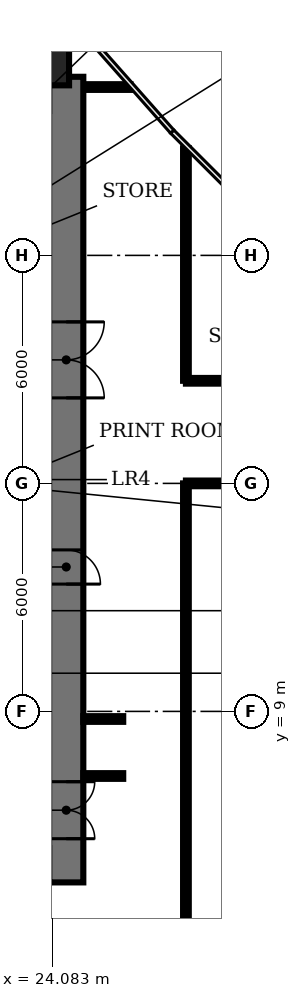
"""IFC4 building model, lengths in metres.
Left out: names, types, materials, properties, quantities, classifications, styles, units other than length and angle.
Written with IfcOpenShell. Run it as: python <this file> out.ifc"""

import sys

from ifc_helpers import new_model, si_unit, direction, frame, frame_2d, origin, origin_2d, place, context, subcontext, project, spatial, rectangle, circle, extrude, element, fill, save


model = new_model("IFC4")
c1 = context("Model", 3, precision=1e-05, world=origin(), true_north=direction((0.0, 1.0)))
c2 = subcontext(c1, "Body", "Model", "MODEL_VIEW")
j1 = project(units=[si_unit("LENGTHUNIT", "METRE"), si_unit("PLANEANGLEUNIT", "RADIAN")], contexts=[c1])
p1 = place(None, origin())
s1 = spatial("IfcSite", under=j1, at=p1, CompositionType="ELEMENT")
p2 = place(p1, origin())
s2 = spatial("IfcBuilding", under=s1, at=p2, CompositionType="ELEMENT")
p3 = place(p2, frame((0.0, 0.0, 37.4)))
s3 = spatial("IfcBuildingStorey", under=s2, at=p3, CompositionType="ELEMENT", Elevation=37.4)
p4 = place(p3, frame((24.0, 26.0, 0.0), z_axis=(0.0, 0.0, 1.0), x_axis=(1.0, 0.0, 0.0)))
e1 = element("IfcColumn", 1, at=p4, inside=s3, PredefinedType="COLUMN", context=c2, shape_type="SweptSolid", body=[
    extrude(circle(Radius=0.525, at=origin_2d()), origin(), (0.0, 0.0, 1.0), 3.85),
])
p5 = place(p3, frame((24.45, 25.7, 0.0), z_axis=(0.0, 0.0, 1.0), x_axis=(0.0, -1.0, 0.0)))
e2 = element("IfcWall", 2, at=p5, inside=s3, PredefinedType="SHEAR", context=c2, shape_type="SweptSolid", body=[
    extrude(rectangle(XDim=21.2, YDim=0.9, at=frame_2d((10.6, 0.0))), origin(), (0.0, 0.0, 1.0), 3.85),
])
p6 = place(p5, frame((18.55, 0.0, 0.0)))
e3 = element("IfcOpeningElement", 3, at=p6, cuts=e2, PredefinedType="OPENING", context=c2, shape_type="SweptSolid", body=[
    extrude(rectangle(XDim=1.5, YDim=2.1, at=frame_2d((0.75, 1.05))), frame((0.0, 0.46, 0.0), z_axis=(0.0, -1.0, 0.0), x_axis=(1.0, 0.0, 0.0)), (0.0, 0.0, 1.0), 0.92),
])
p7 = place(p5, frame((12.45, 0.0, 0.0)))
e4 = element("IfcOpeningElement", 4, at=p7, cuts=e2, PredefinedType="OPENING", context=c2, shape_type="SweptSolid", body=[
    extrude(rectangle(XDim=0.9, YDim=2.1, at=frame_2d((0.45, 1.05))), frame((0.0, 0.46, 0.0), z_axis=(0.0, -1.0, 0.0), x_axis=(1.0, 0.0, 0.0)), (0.0, 0.0, 1.0), 0.92),
])
p8 = place(p5, frame((6.45, 0.0, 0.0)))
e5 = element("IfcOpeningElement", 5, at=p8, cuts=e2, PredefinedType="OPENING", context=c2, shape_type="SweptSolid", body=[
    extrude(rectangle(XDim=2.0, YDim=2.1, at=frame_2d((1.0, 1.05))), frame((0.0, 0.46, 0.0), z_axis=(0.0, -1.0, 0.0), x_axis=(1.0, 0.0, 0.0)), (0.0, 0.0, 1.0), 0.92),
])
for number, where, z_axis, x_axis in (
    (6, (24.9, 7.3, 0.0), (0.0, 0.0, 1.0), (1.0, 0.0, 0.0)),
    (7, (24.9, 8.8, 0.0), (0.0, 0.0, 1.0), (1.0, 0.0, 0.0)),
):
    element("IfcWall", number, at=place(p3, frame(where, z_axis=z_axis, x_axis=x_axis)), inside=s3, PredefinedType="PARTITIONING", context=c2, shape_type="SweptSolid", body=[
        extrude(rectangle(XDim=1.05, YDim=0.15, at=frame_2d((0.525, 0.0))), origin(), (0.0, 0.0, 1.0), 2.83),
    ])
p9 = place(p3, frame((25.0, 25.43, 0.0), z_axis=(0.0, 0.0, 1.0), x_axis=(1.0, 0.0, 0.0)))
e8 = element("IfcWall", 8, at=p9, inside=s3, PredefinedType="PARTITIONING", context=c2, shape_type="SweptSolid", body=[
    extrude(rectangle(XDim=1.14, YDim=0.15, at=frame_2d((0.57, 0.0))), origin(), (0.0, 0.0, 1.0), 2.83),
])
p10 = place(p3, frame((27.6, 0.6, 0.0), z_axis=(0.0, 0.0, 1.0), x_axis=(0.0, 1.0, 0.0)))
e9 = element("IfcWall", 9, at=p10, inside=s3, PredefinedType="PARTITIONING", context=c2, shape_type="SweptSolid", body=[
    extrude(rectangle(XDim=14.4, YDim=0.15, at=frame_2d((7.2, 0.0))), origin(), (0.0, 0.0, 1.0), 2.83),
])
p11 = place(p3, frame((27.6, 17.7, 0.0), z_axis=(0.0, 0.0, 1.0), x_axis=(0.0, 1.0, 0.0)))
e10 = element("IfcWall", 10, at=p11, inside=s3, PredefinedType="PARTITIONING", context=c2, shape_type="SweptSolid", body=[
    extrude(rectangle(XDim=6.12, YDim=0.15, at=frame_2d((3.06, 0.0))), origin(), (0.0, 0.0, 1.0), 2.83),
])
p12 = place(p3, frame((27.6, 17.7, 0.0), z_axis=(0.0, 0.0, 1.0), x_axis=(1.0, 0.0, 0.0)))
e11 = element("IfcWall", 11, at=p12, inside=s3, PredefinedType="PARTITIONING", context=c2, shape_type="SweptSolid", body=[
    extrude(rectangle(XDim=8.4, YDim=0.15, at=frame_2d((4.2, 0.0))), origin(), (0.0, 0.0, 1.0), 2.83),
])
p13 = place(p12, frame((3.9, 0.0, 0.0)))
e12 = element("IfcOpeningElement", 12, at=p13, cuts=e11, PredefinedType="OPENING", context=c2, shape_type="SweptSolid", body=[
    extrude(rectangle(XDim=1.0, YDim=2.1, at=frame_2d((0.5, 1.05))), frame((0.0, 0.085, 0.0), z_axis=(0.0, -1.0, 0.0), x_axis=(1.0, 0.0, 0.0)), (0.0, 0.0, 1.0), 0.17),
])
p14 = place(p3, frame((42.0, 15.0, 0.0), z_axis=(0.0, 0.0, 1.0), x_axis=(-1.0, 0.0, 0.0)))
e13 = element("IfcWall", 13, at=p14, inside=s3, PredefinedType="PARTITIONING", context=c2, shape_type="SweptSolid", body=[
    extrude(rectangle(XDim=14.4, YDim=0.15, at=frame_2d((7.2, 0.0))), origin(), (0.0, 0.0, 1.0), 2.83),
])
p15 = place(p14, frame((6.7, 0.0, 0.0)))
e14 = element("IfcOpeningElement", 14, at=p15, cuts=e13, PredefinedType="OPENING", context=c2, shape_type="SweptSolid", body=[
    extrude(rectangle(XDim=1.2, YDim=2.1, at=frame_2d((0.6, 1.05))), frame((0.0, 0.085, 0.0), z_axis=(0.0, -1.0, 0.0), x_axis=(1.0, 0.0, 0.0)), (0.0, 0.0, 1.0), 0.17),
])
p16 = place(p6, origin())
e15 = element("IfcDoor", 15, at=p16, inside=s3, OperationType="DOUBLE_DOOR_SINGLE_SWING", PredefinedType="DOOR", context=c2, shape_type="SweptSolid", body=[
    extrude(rectangle(XDim=1.5, YDim=2.1, at=frame_2d((0.75, 1.05))), frame((0.0, 0.025, 0.0), z_axis=(0.0, -1.0, 0.0), x_axis=(1.0, 0.0, 0.0)), (0.0, 0.0, 1.0), 0.05),
])
fill(e3, e15)
p17 = place(p8, origin())
e16 = element("IfcDoor", 16, at=p17, inside=s3, OperationType="DOUBLE_DOOR_SINGLE_SWING", PredefinedType="DOOR", context=c2, shape_type="SweptSolid", body=[
    extrude(rectangle(XDim=2.0, YDim=2.1, at=frame_2d((1.0, 1.05))), frame((0.0, 0.025, 0.0), z_axis=(0.0, -1.0, 0.0), x_axis=(1.0, 0.0, 0.0)), (0.0, 0.0, 1.0), 0.05),
])
fill(e5, e16)
save(model, sys.argv[1])
